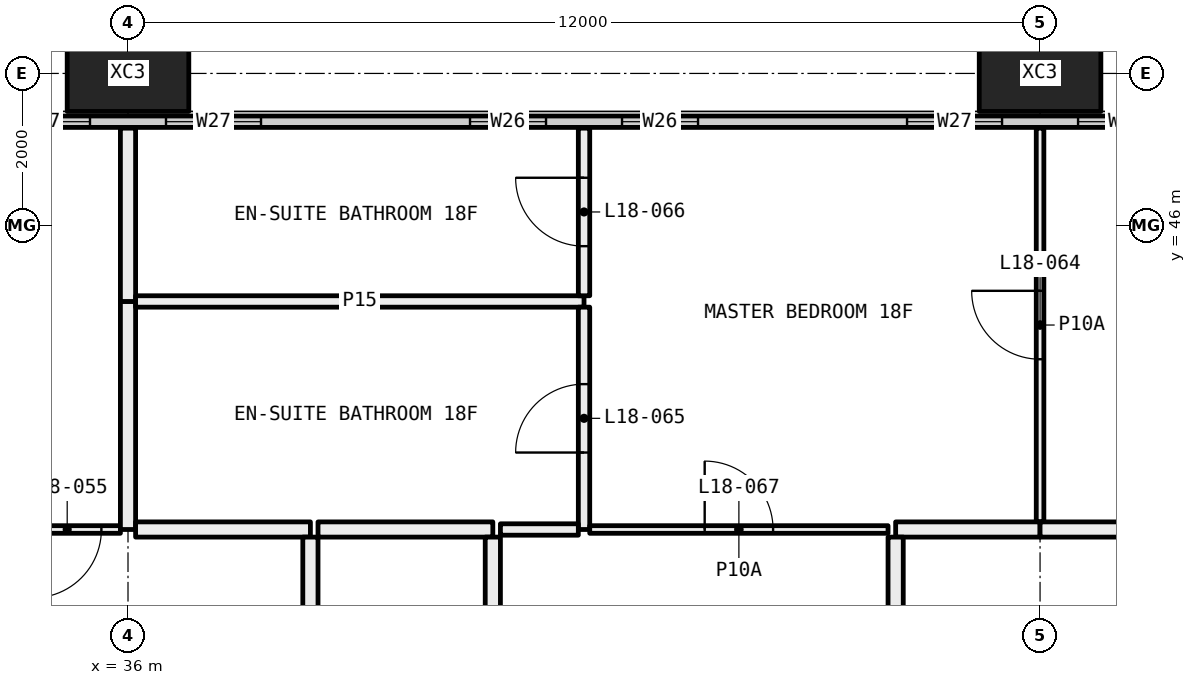
"""IFC4 building model, lengths in metres.
Left out: names, types, materials, properties, quantities, classifications, styles, units other than length and angle.
Written with IfcOpenShell. Run it as: python <this file> out.ifc"""

import sys

from ifc_helpers import new_model, si_unit, direction, frame, frame_2d, origin, origin_2d, place, context, subcontext, project, spatial, rectangle, hollow_rectangle, extrude, element, fill, save


model = new_model("IFC4")
c1 = context("Model", 3, precision=1e-05, world=origin(), true_north=direction((0.0, 1.0)))
c2 = subcontext(c1, "Body", "Model", "MODEL_VIEW")
j1 = project(units=[si_unit("LENGTHUNIT", "METRE"), si_unit("PLANEANGLEUNIT", "RADIAN")], contexts=[c1])
p1 = place(None, origin())
s1 = spatial("IfcSite", under=j1, at=p1, CompositionType="ELEMENT")
p2 = place(p1, origin())
s2 = spatial("IfcBuilding", under=s1, at=p2, CompositionType="ELEMENT")
p3 = place(p2, frame((0.0, 0.0, 74.85)))
s3 = spatial("IfcBuildingStorey", under=s2, at=p3, CompositionType="ELEMENT", Elevation=74.85)
for number, where, z_axis, x_axis in (
    (1, (36.0, 48.0, -0.4), (0.0, 0.0, 1.0), (1.0, 0.0, 0.0)),
    (2, (48.0, 48.0, -0.4), (0.0, 0.0, 1.0), (1.0, 0.0, 0.0)),
):
    element("IfcColumn", number, at=place(p3, frame(where, z_axis=z_axis, x_axis=x_axis)), inside=s3, PredefinedType="COLUMN", context=c2, shape_type="SweptSolid", body=[
        extrude(hollow_rectangle(XDim=1.6, YDim=1.0, WallThickness=0.065, at=origin_2d()), origin(), (0.0, 0.0, 1.0), 3.45),
    ])
p4 = place(p3, frame((6.56, 47.365, 0.0), z_axis=(0.0, 0.0, 1.0), x_axis=(1.0, 0.0, 0.0)))
e3 = element("IfcWall", 3, at=p4, inside=s3, PredefinedType="ELEMENTEDWALL", context=c2, shape_type="SweptSolid", body=[
    extrude(rectangle(XDim=58.88, YDim=0.15, at=frame_2d((29.44, 0.0))), origin(), (0.0, 0.0, 1.0), 3.05),
])
p5 = place(p4, frame((0.44, 0.0, 0.45)))
e4 = element("IfcOpeningElement", 4, at=p5, cuts=e3, PredefinedType="OPENING", context=c2, shape_type="SweptSolid", body=[
    extrude(rectangle(XDim=4.5, YDim=2.55, at=frame_2d((2.25, 1.275))), frame((0.0, 0.085, 0.0), z_axis=(0.0, -1.0, 0.0), x_axis=(1.0, 0.0, 0.0)), (0.0, 0.0, 1.0), 0.17),
])
p6 = place(p4, frame((5.94, 0.0, 0.45)))
e5 = element("IfcOpeningElement", 5, at=p6, cuts=e3, PredefinedType="OPENING", context=c2, shape_type="SweptSolid", body=[
    extrude(rectangle(XDim=1.25, YDim=2.55, at=frame_2d((0.625, 1.275))), frame((0.0, 0.085, 0.0), z_axis=(0.0, -1.0, 0.0), x_axis=(1.0, 0.0, 0.0)), (0.0, 0.0, 1.0), 0.17),
])
p7 = place(p4, frame((9.94, 0.0, 0.45)))
e6 = element("IfcOpeningElement", 6, at=p7, cuts=e3, PredefinedType="OPENING", context=c2, shape_type="SweptSolid", body=[
    extrude(rectangle(XDim=1.0, YDim=2.55, at=frame_2d((0.5, 1.275))), frame((0.0, 0.085, 0.0), z_axis=(0.0, -1.0, 0.0), x_axis=(1.0, 0.0, 0.0)), (0.0, 0.0, 1.0), 0.17),
])
p8 = place(p4, frame((11.94, 0.0, 0.45)))
e7 = element("IfcOpeningElement", 7, at=p8, cuts=e3, PredefinedType="OPENING", context=c2, shape_type="SweptSolid", body=[
    extrude(rectangle(XDim=1.0, YDim=2.55, at=frame_2d((0.5, 1.275))), frame((0.0, 0.085, 0.0), z_axis=(0.0, -1.0, 0.0), x_axis=(1.0, 0.0, 0.0)), (0.0, 0.0, 1.0), 0.17),
])
p9 = place(p4, frame((15.69, 0.0, 0.45)))
e8 = element("IfcOpeningElement", 8, at=p9, cuts=e3, PredefinedType="OPENING", context=c2, shape_type="SweptSolid", body=[
    extrude(rectangle(XDim=1.25, YDim=2.55, at=frame_2d((0.625, 1.275))), frame((0.0, 0.085, 0.0), z_axis=(0.0, -1.0, 0.0), x_axis=(1.0, 0.0, 0.0)), (0.0, 0.0, 1.0), 0.17),
])
p10 = place(p4, frame((17.94, 0.0, 0.45)))
e9 = element("IfcOpeningElement", 9, at=p10, cuts=e3, PredefinedType="OPENING", context=c2, shape_type="SweptSolid", body=[
    extrude(rectangle(XDim=1.25, YDim=2.55, at=frame_2d((0.625, 1.275))), frame((0.0, 0.085, 0.0), z_axis=(0.0, -1.0, 0.0), x_axis=(1.0, 0.0, 0.0)), (0.0, 0.0, 1.0), 0.17),
])
p11 = place(p4, frame((21.94, 0.0, 0.45)))
e10 = element("IfcOpeningElement", 10, at=p11, cuts=e3, PredefinedType="OPENING", context=c2, shape_type="SweptSolid", body=[
    extrude(rectangle(XDim=1.0, YDim=2.55, at=frame_2d((0.5, 1.275))), frame((0.0, 0.085, 0.0), z_axis=(0.0, -1.0, 0.0), x_axis=(1.0, 0.0, 0.0)), (0.0, 0.0, 1.0), 0.17),
])
p12 = place(p4, frame((23.94, 0.0, 0.45)))
e11 = element("IfcOpeningElement", 11, at=p12, cuts=e3, PredefinedType="OPENING", context=c2, shape_type="SweptSolid", body=[
    extrude(rectangle(XDim=1.0, YDim=2.55, at=frame_2d((0.5, 1.275))), frame((0.0, 0.085, 0.0), z_axis=(0.0, -1.0, 0.0), x_axis=(1.0, 0.0, 0.0)), (0.0, 0.0, 1.0), 0.17),
])
p13 = place(p4, frame((27.69, 0.0, 0.45)))
e12 = element("IfcOpeningElement", 12, at=p13, cuts=e3, PredefinedType="OPENING", context=c2, shape_type="SweptSolid", body=[
    extrude(rectangle(XDim=1.25, YDim=2.55, at=frame_2d((0.625, 1.275))), frame((0.0, 0.085, 0.0), z_axis=(0.0, -1.0, 0.0), x_axis=(1.0, 0.0, 0.0)), (0.0, 0.0, 1.0), 0.17),
])
p14 = place(p4, frame((29.94, 0.0, 0.45)))
e13 = element("IfcOpeningElement", 13, at=p14, cuts=e3, PredefinedType="OPENING", context=c2, shape_type="SweptSolid", body=[
    extrude(rectangle(XDim=1.25, YDim=2.55, at=frame_2d((0.625, 1.275))), frame((0.0, 0.085, 0.0), z_axis=(0.0, -1.0, 0.0), x_axis=(1.0, 0.0, 0.0)), (0.0, 0.0, 1.0), 0.17),
])
p15 = place(p4, frame((33.94, 0.0, 0.45)))
e14 = element("IfcOpeningElement", 14, at=p15, cuts=e3, PredefinedType="OPENING", context=c2, shape_type="SweptSolid", body=[
    extrude(rectangle(XDim=1.0, YDim=2.55, at=frame_2d((0.5, 1.275))), frame((0.0, 0.085, 0.0), z_axis=(0.0, -1.0, 0.0), x_axis=(1.0, 0.0, 0.0)), (0.0, 0.0, 1.0), 0.17),
])
p16 = place(p4, frame((35.94, 0.0, 0.45)))
e15 = element("IfcOpeningElement", 15, at=p16, cuts=e3, PredefinedType="OPENING", context=c2, shape_type="SweptSolid", body=[
    extrude(rectangle(XDim=1.0, YDim=2.55, at=frame_2d((0.5, 1.275))), frame((0.0, 0.085, 0.0), z_axis=(0.0, -1.0, 0.0), x_axis=(1.0, 0.0, 0.0)), (0.0, 0.0, 1.0), 0.17),
])
p17 = place(p4, frame((39.69, 0.0, 0.45)))
e16 = element("IfcOpeningElement", 16, at=p17, cuts=e3, PredefinedType="OPENING", context=c2, shape_type="SweptSolid", body=[
    extrude(rectangle(XDim=1.25, YDim=2.55, at=frame_2d((0.625, 1.275))), frame((0.0, 0.085, 0.0), z_axis=(0.0, -1.0, 0.0), x_axis=(1.0, 0.0, 0.0)), (0.0, 0.0, 1.0), 0.17),
])
p18 = place(p4, frame((41.94, 0.0, 0.45)))
e17 = element("IfcOpeningElement", 17, at=p18, cuts=e3, PredefinedType="OPENING", context=c2, shape_type="SweptSolid", body=[
    extrude(rectangle(XDim=1.25, YDim=2.55, at=frame_2d((0.625, 1.275))), frame((0.0, 0.085, 0.0), z_axis=(0.0, -1.0, 0.0), x_axis=(1.0, 0.0, 0.0)), (0.0, 0.0, 1.0), 0.17),
])
p19 = place(p4, frame((45.94, 0.0, 0.45)))
e18 = element("IfcOpeningElement", 18, at=p19, cuts=e3, PredefinedType="OPENING", context=c2, shape_type="SweptSolid", body=[
    extrude(rectangle(XDim=1.0, YDim=2.55, at=frame_2d((0.5, 1.275))), frame((0.0, 0.085, 0.0), z_axis=(0.0, -1.0, 0.0), x_axis=(1.0, 0.0, 0.0)), (0.0, 0.0, 1.0), 0.17),
])
p20 = place(p4, frame((47.94, 0.0, 0.45)))
e19 = element("IfcOpeningElement", 19, at=p20, cuts=e3, PredefinedType="OPENING", context=c2, shape_type="SweptSolid", body=[
    extrude(rectangle(XDim=1.0, YDim=2.55, at=frame_2d((0.5, 1.275))), frame((0.0, 0.085, 0.0), z_axis=(0.0, -1.0, 0.0), x_axis=(1.0, 0.0, 0.0)), (0.0, 0.0, 1.0), 0.17),
])
p21 = place(p4, frame((51.69, 0.0, 0.45)))
e20 = element("IfcOpeningElement", 20, at=p21, cuts=e3, PredefinedType="OPENING", context=c2, shape_type="SweptSolid", body=[
    extrude(rectangle(XDim=1.25, YDim=2.55, at=frame_2d((0.625, 1.275))), frame((0.0, 0.085, 0.0), z_axis=(0.0, -1.0, 0.0), x_axis=(1.0, 0.0, 0.0)), (0.0, 0.0, 1.0), 0.17),
])
p22 = place(p4, frame((53.94, 0.0, 0.45)))
e21 = element("IfcOpeningElement", 21, at=p22, cuts=e3, PredefinedType="OPENING", context=c2, shape_type="SweptSolid", body=[
    extrude(rectangle(XDim=4.5, YDim=2.55, at=frame_2d((2.25, 1.275))), frame((0.0, 0.085, 0.0), z_axis=(0.0, -1.0, 0.0), x_axis=(1.0, 0.0, 0.0)), (0.0, 0.0, 1.0), 0.17),
])
p23 = place(p3, frame((34.5, 42.0, 0.0), z_axis=(0.0, 0.0, 1.0), x_axis=(1.0, 0.0, 0.0)))
e22 = element("IfcWall", 22, at=p23, inside=s3, PredefinedType="PARTITIONING", context=c2, shape_type="SweptSolid", body=[
    extrude(rectangle(XDim=1.4, YDim=0.1, at=frame_2d((0.7, 0.0))), origin(), (0.0, 0.0, 1.0), 3.05),
])
p24 = place(p23, frame((0.25, 0.0, 0.0)))
e23 = element("IfcOpeningElement", 23, at=p24, cuts=e22, PredefinedType="OPENING", context=c2, shape_type="SweptSolid", body=[
    extrude(rectangle(XDim=0.9, YDim=2.1, at=frame_2d((0.45, 1.05))), frame((0.0, 0.06, 0.0), z_axis=(0.0, -1.0, 0.0), x_axis=(1.0, 0.0, 0.0)), (0.0, 0.0, 1.0), 0.12),
])
p25 = place(p3, frame((36.0, 42.0, 0.0), z_axis=(0.0, 0.0, 1.0), x_axis=(0.0, 1.0, 0.0)))
e24 = element("IfcWall", 24, at=p25, inside=s3, PredefinedType="PARTITIONING", context=c2, shape_type="SweptSolid", body=[
    extrude(rectangle(XDim=3.0, YDim=0.2, at=frame_2d((1.5, 0.0))), origin(), (0.0, 0.0, 1.0), 2.45),
])
p26 = place(p3, frame((36.0, 45.0, 0.0), z_axis=(0.0, 0.0, 1.0), x_axis=(0.0, 1.0, 0.0)))
e25 = element("IfcWall", 25, at=p26, inside=s3, PredefinedType="PARTITIONING", context=c2, shape_type="SweptSolid", body=[
    extrude(rectangle(XDim=2.28, YDim=0.2, at=frame_2d((1.14, 0.0))), origin(), (0.0, 0.0, 1.0), 2.45),
])
p27 = place(p3, frame((38.4, 42.0, 0.0), z_axis=(0.0, 0.0, 1.0), x_axis=(-1.0, 0.0, 0.0)))
e26 = element("IfcWall", 26, at=p27, inside=s3, PredefinedType="PARTITIONING", context=c2, shape_type="SweptSolid", body=[
    extrude(rectangle(XDim=2.3, YDim=0.2, at=frame_2d((1.15, 0.0))), origin(), (0.0, 0.0, 1.0), 3.05),
])
p28 = place(p3, frame((38.4, 36.1, 0.0), z_axis=(0.0, 0.0, 1.0), x_axis=(0.0, 1.0, 0.0)))
e27 = element("IfcWall", 27, at=p28, inside=s3, PredefinedType="PARTITIONING", context=c2, shape_type="SweptSolid", body=[
    extrude(rectangle(XDim=5.8, YDim=0.2, at=frame_2d((2.9, 0.0))), origin(), (0.0, 0.0, 1.0), 3.05),
])
p29 = place(p3, frame((42.0, 45.0, 0.0), z_axis=(0.0, 0.0, 1.0), x_axis=(-1.0, 0.0, 0.0)))
e28 = element("IfcWall", 28, at=p29, inside=s3, PredefinedType="PARTITIONING", context=c2, shape_type="SweptSolid", body=[
    extrude(rectangle(XDim=5.9, YDim=0.15, at=frame_2d((2.95, 0.0))), origin(), (0.0, 0.0, 1.0), 3.05),
])
p30 = place(p3, frame((42.0, 42.0, 0.0), z_axis=(0.0, 0.0, 1.0), x_axis=(0.0, 1.0, 0.0)))
e29 = element("IfcWall", 29, at=p30, inside=s3, PredefinedType="PARTITIONING", context=c2, shape_type="SweptSolid", body=[
    extrude(rectangle(XDim=2.925, YDim=0.15, at=frame_2d((1.462, 0.0))), origin(), (0.0, 0.0, 1.0), 3.05),
])
p31 = place(p30, frame((1.012, 0.0, 0.0)))
e30 = element("IfcOpeningElement", 30, at=p31, cuts=e29, PredefinedType="OPENING", context=c2, shape_type="SweptSolid", body=[
    extrude(rectangle(XDim=0.9, YDim=2.1, at=frame_2d((0.45, 1.05))), frame((0.0, 0.085, 0.0), z_axis=(0.0, -1.0, 0.0), x_axis=(1.0, 0.0, 0.0)), (0.0, 0.0, 1.0), 0.17),
])
p32 = place(p3, frame((40.9, 42.0, 0.0), z_axis=(0.0, 0.0, 1.0), x_axis=(1.0, 0.0, 0.0)))
e31 = element("IfcWall", 31, at=p32, inside=s3, PredefinedType="PARTITIONING", context=c2, shape_type="SweptSolid", body=[
    extrude(rectangle(XDim=1.025, YDim=0.15, at=frame_2d((0.513, 0.0))), origin(), (0.0, 0.0, 1.0), 3.05),
])
p33 = place(p3, frame((38.5, 42.0, 0.0), z_axis=(0.0, 0.0, 1.0), x_axis=(1.0, 0.0, 0.0)))
e32 = element("IfcWall", 32, at=p33, inside=s3, PredefinedType="PARTITIONING", context=c2, shape_type="SweptSolid", body=[
    extrude(rectangle(XDim=2.3, YDim=0.2, at=frame_2d((1.15, 0.0))), origin(), (0.0, 0.0, 1.0), 3.05),
])
p34 = place(p3, frame((42.0, 45.075, 0.0), z_axis=(0.0, 0.0, 1.0), x_axis=(0.0, 1.0, 0.0)))
e33 = element("IfcWall", 33, at=p34, inside=s3, PredefinedType="PARTITIONING", context=c2, shape_type="SweptSolid", body=[
    extrude(rectangle(XDim=2.205, YDim=0.15, at=frame_2d((1.103, 0.0))), origin(), (0.0, 0.0, 1.0), 3.05),
])
p35 = place(p34, frame((0.653, 0.0, 0.0)))
e34 = element("IfcOpeningElement", 34, at=p35, cuts=e33, PredefinedType="OPENING", context=c2, shape_type="SweptSolid", body=[
    extrude(rectangle(XDim=0.9, YDim=2.1, at=frame_2d((0.45, 1.05))), frame((0.0, 0.085, 0.0), z_axis=(0.0, -1.0, 0.0), x_axis=(1.0, 0.0, 0.0)), (0.0, 0.0, 1.0), 0.17),
])
p36 = place(p3, frame((48.0, 42.1, 0.0), z_axis=(0.0, 0.0, 1.0), x_axis=(0.0, 1.0, 0.0)))
e35 = element("IfcWall", 35, at=p36, inside=s3, PredefinedType="PARTITIONING", context=c2, shape_type="SweptSolid", body=[
    extrude(rectangle(XDim=5.18, YDim=0.1, at=frame_2d((2.59, 0.0))), origin(), (0.0, 0.0, 1.0), 3.05),
])
p37 = place(p36, frame((2.14, 0.0, 0.0)))
e36 = element("IfcOpeningElement", 36, at=p37, cuts=e35, PredefinedType="OPENING", context=c2, shape_type="SweptSolid", body=[
    extrude(rectangle(XDim=0.9, YDim=2.1, at=frame_2d((0.45, 1.05))), frame((0.0, 0.06, 0.0), z_axis=(0.0, -1.0, 0.0), x_axis=(1.0, 0.0, 0.0)), (0.0, 0.0, 1.0), 0.12),
])
p38 = place(p3, frame((42.075, 42.0, 0.0), z_axis=(0.0, 0.0, 1.0), x_axis=(1.0, 0.0, 0.0)))
e37 = element("IfcWall", 37, at=p38, inside=s3, PredefinedType="PARTITIONING", context=c2, shape_type="SweptSolid", body=[
    extrude(rectangle(XDim=3.925, YDim=0.1, at=frame_2d((1.962, 0.0))), origin(), (0.0, 0.0, 1.0), 3.05),
])
p39 = place(p38, frame((1.512, 0.0, 0.0)))
e38 = element("IfcOpeningElement", 38, at=p39, cuts=e37, PredefinedType="OPENING", context=c2, shape_type="SweptSolid", body=[
    extrude(rectangle(XDim=0.9, YDim=2.1, at=frame_2d((0.45, 1.05))), frame((0.0, 0.06, 0.0), z_axis=(0.0, -1.0, 0.0), x_axis=(1.0, 0.0, 0.0)), (0.0, 0.0, 1.0), 0.12),
])
p40 = place(p3, frame((46.1, 42.0, 0.0), z_axis=(0.0, 0.0, 1.0), x_axis=(1.0, 0.0, 0.0)))
e39 = element("IfcWall", 39, at=p40, inside=s3, PredefinedType="PARTITIONING", context=c2, shape_type="SweptSolid", body=[
    extrude(rectangle(XDim=1.9, YDim=0.2, at=frame_2d((0.95, 0.0))), origin(), (0.0, 0.0, 1.0), 3.05),
])
p41 = place(p3, frame((48.0, 42.0, 0.0), z_axis=(0.0, 0.0, 1.0), x_axis=(1.0, 0.0, 0.0)))
e40 = element("IfcWall", 40, at=p41, inside=s3, PredefinedType="PARTITIONING", context=c2, shape_type="SweptSolid", body=[
    extrude(rectangle(XDim=6.0, YDim=0.2, at=frame_2d((3.0, 0.0))), origin(), (0.0, 0.0, 1.0), 3.05),
])
p42 = place(p3, frame((40.8, 41.9, 0.0), z_axis=(0.0, 0.0, 1.0), x_axis=(0.0, -1.0, 0.0)))
e41 = element("IfcWall", 41, at=p42, inside=s3, PredefinedType="PARTITIONING", context=c2, shape_type="SweptSolid", body=[
    extrude(rectangle(XDim=6.2, YDim=0.2, at=frame_2d((3.1, 0.0))), origin(), (0.0, 0.0, 1.0), 2.45),
])
p43 = place(p3, frame((46.1, 36.1, 0.0), z_axis=(0.0, 0.0, 1.0), x_axis=(0.0, 1.0, 0.0)))
e42 = element("IfcWall", 42, at=p43, inside=s3, PredefinedType="PARTITIONING", context=c2, shape_type="SweptSolid", body=[
    extrude(rectangle(XDim=5.8, YDim=0.2, at=frame_2d((2.9, 0.0))), origin(), (0.0, 0.0, 1.0), 3.05),
])
p44 = place(p13, origin())
e43 = element("IfcWindow", 43, at=p44, inside=s3, PartitioningType="SINGLE_PANEL", PredefinedType="WINDOW", context=c2, shape_type="SweptSolid", body=[
    extrude(rectangle(XDim=1.25, YDim=2.55, at=frame_2d((0.625, 1.275))), frame((0.0, 0.03, 0.0), z_axis=(0.0, -1.0, 0.0), x_axis=(1.0, 0.0, 0.0)), (0.0, 0.0, 1.0), 0.06),
])
fill(e12, e43)
p45 = place(p14, origin())
e44 = element("IfcWindow", 44, at=p45, inside=s3, PartitioningType="SINGLE_PANEL", PredefinedType="WINDOW", context=c2, shape_type="SweptSolid", body=[
    extrude(rectangle(XDim=1.25, YDim=2.55, at=frame_2d((0.625, 1.275))), frame((0.0, 0.03, 0.0), z_axis=(0.0, -1.0, 0.0), x_axis=(1.0, 0.0, 0.0)), (0.0, 0.0, 1.0), 0.06),
])
fill(e13, e44)
p46 = place(p15, origin())
e45 = element("IfcWindow", 45, at=p46, inside=s3, PartitioningType="SINGLE_PANEL", PredefinedType="WINDOW", context=c2, shape_type="SweptSolid", body=[
    extrude(rectangle(XDim=1.0, YDim=2.55, at=frame_2d((0.5, 1.275))), frame((0.0, 0.03, 0.0), z_axis=(0.0, -1.0, 0.0), x_axis=(1.0, 0.0, 0.0)), (0.0, 0.0, 1.0), 0.06),
])
fill(e14, e45)
p47 = place(p16, origin())
e46 = element("IfcWindow", 46, at=p47, inside=s3, PartitioningType="SINGLE_PANEL", PredefinedType="WINDOW", context=c2, shape_type="SweptSolid", body=[
    extrude(rectangle(XDim=1.0, YDim=2.55, at=frame_2d((0.5, 1.275))), frame((0.0, 0.03, 0.0), z_axis=(0.0, -1.0, 0.0), x_axis=(1.0, 0.0, 0.0)), (0.0, 0.0, 1.0), 0.06),
])
fill(e15, e46)
p48 = place(p17, origin())
e47 = element("IfcWindow", 47, at=p48, inside=s3, PartitioningType="SINGLE_PANEL", PredefinedType="WINDOW", context=c2, shape_type="SweptSolid", body=[
    extrude(rectangle(XDim=1.25, YDim=2.55, at=frame_2d((0.625, 1.275))), frame((0.0, 0.03, 0.0), z_axis=(0.0, -1.0, 0.0), x_axis=(1.0, 0.0, 0.0)), (0.0, 0.0, 1.0), 0.06),
])
fill(e16, e47)
p49 = place(p18, origin())
e48 = element("IfcWindow", 48, at=p49, inside=s3, PartitioningType="SINGLE_PANEL", PredefinedType="WINDOW", context=c2, shape_type="SweptSolid", body=[
    extrude(rectangle(XDim=1.25, YDim=2.55, at=frame_2d((0.625, 1.275))), frame((0.0, 0.03, 0.0), z_axis=(0.0, -1.0, 0.0), x_axis=(1.0, 0.0, 0.0)), (0.0, 0.0, 1.0), 0.06),
])
fill(e17, e48)
p50 = place(p24, frame((0.9, 0.0, 0.0), x_axis=(-1.0, 0.0, 0.0)))
e49 = element("IfcDoor", 49, at=p50, inside=s3, OperationType="SINGLE_SWING_LEFT", PredefinedType="DOOR", context=c2, shape_type="SweptSolid", body=[
    extrude(rectangle(XDim=0.9, YDim=2.1, at=frame_2d((0.45, 1.05))), frame((0.0, 0.025, 0.0), z_axis=(0.0, -1.0, 0.0), x_axis=(1.0, 0.0, 0.0)), (0.0, 0.0, 1.0), 0.05),
])
fill(e23, e49)
p51 = place(p37, origin())
e50 = element("IfcDoor", 50, at=p51, inside=s3, OperationType="SINGLE_SWING_LEFT", PredefinedType="DOOR", context=c2, shape_type="SweptSolid", body=[
    extrude(rectangle(XDim=0.9, YDim=2.1, at=frame_2d((0.45, 1.05))), frame((0.0, 0.025, 0.0), z_axis=(0.0, -1.0, 0.0), x_axis=(1.0, 0.0, 0.0)), (0.0, 0.0, 1.0), 0.05),
])
fill(e36, e50)
p52 = place(p31, origin())
e51 = element("IfcDoor", 51, at=p52, inside=s3, OperationType="SINGLE_SWING_RIGHT", PredefinedType="DOOR", context=c2, shape_type="SweptSolid", body=[
    extrude(rectangle(XDim=0.9, YDim=2.1, at=frame_2d((0.45, 1.05))), frame((0.0, 0.025, 0.0), z_axis=(0.0, -1.0, 0.0), x_axis=(1.0, 0.0, 0.0)), (0.0, 0.0, 1.0), 0.05),
])
fill(e30, e51)
p53 = place(p35, origin())
e52 = element("IfcDoor", 52, at=p53, inside=s3, OperationType="SINGLE_SWING_LEFT", PredefinedType="DOOR", context=c2, shape_type="SweptSolid", body=[
    extrude(rectangle(XDim=0.9, YDim=2.1, at=frame_2d((0.45, 1.05))), frame((0.0, 0.025, 0.0), z_axis=(0.0, -1.0, 0.0), x_axis=(1.0, 0.0, 0.0)), (0.0, 0.0, 1.0), 0.05),
])
fill(e34, e52)
p54 = place(p39, origin())
e53 = element("IfcDoor", 53, at=p54, inside=s3, OperationType="SINGLE_SWING_RIGHT", PredefinedType="DOOR", context=c2, shape_type="SweptSolid", body=[
    extrude(rectangle(XDim=0.9, YDim=2.1, at=frame_2d((0.45, 1.05))), frame((0.0, 0.025, 0.0), z_axis=(0.0, -1.0, 0.0), x_axis=(1.0, 0.0, 0.0)), (0.0, 0.0, 1.0), 0.05),
])
fill(e38, e53)
save(model, sys.argv[1])
